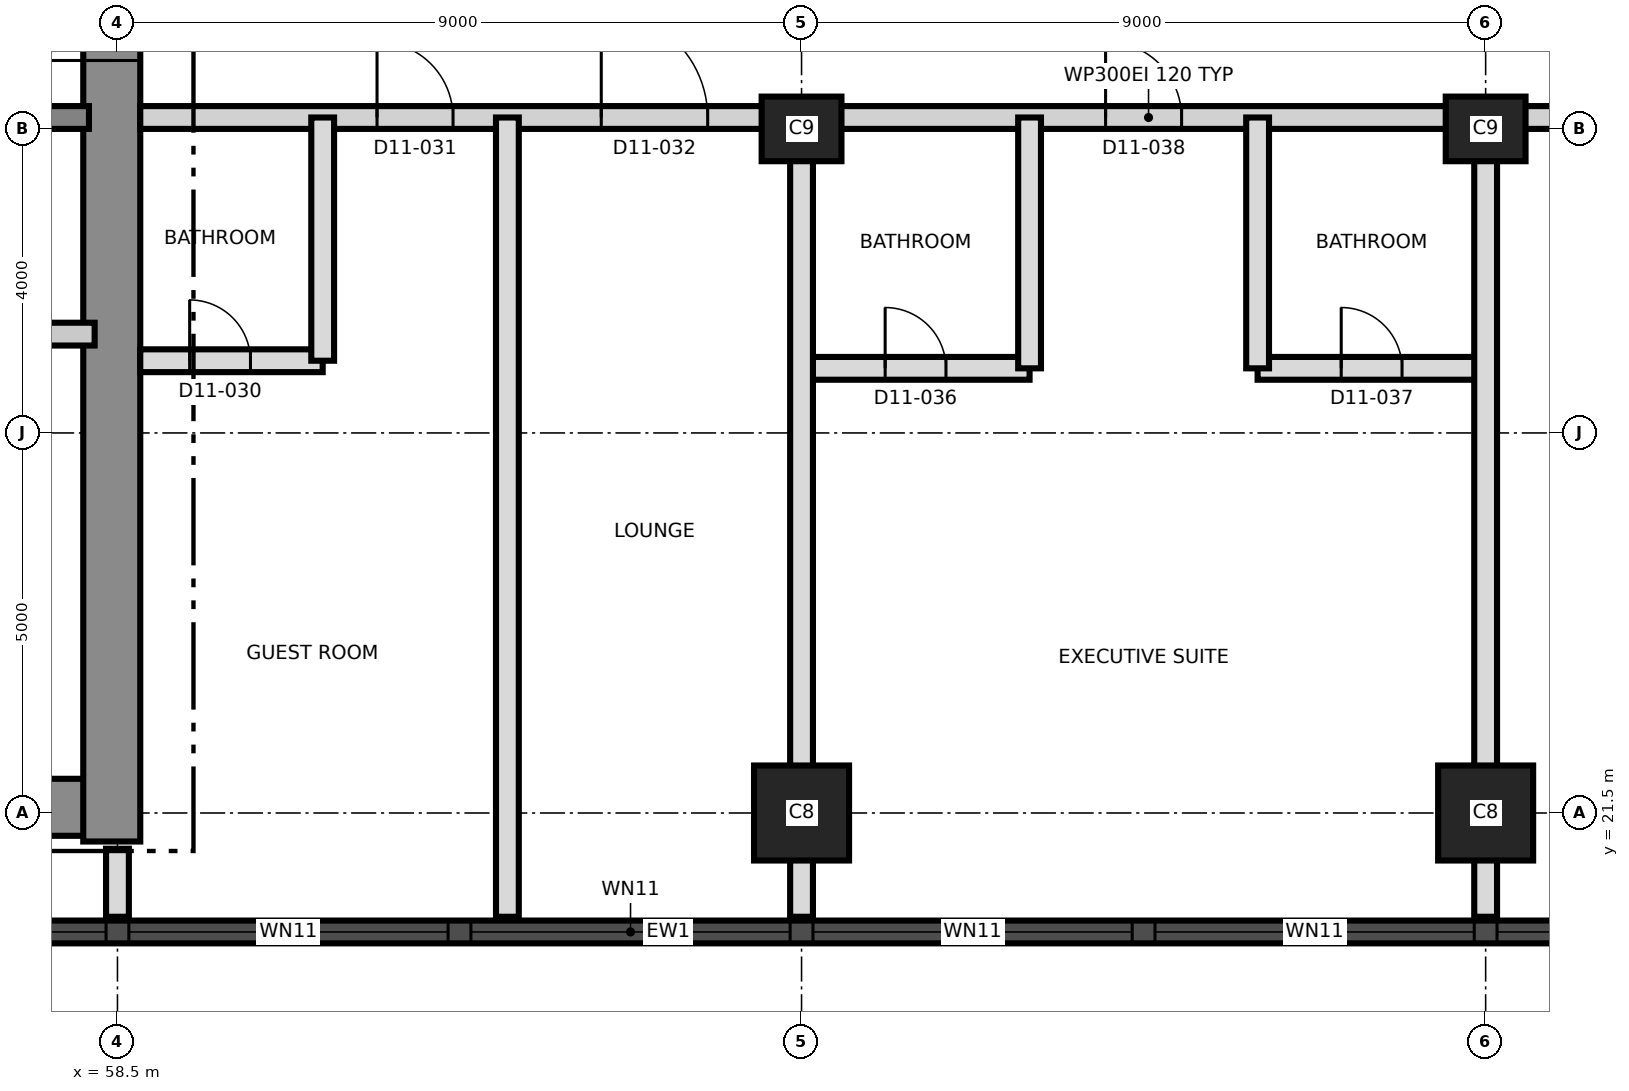
"""IFC4 building model, lengths in metres.
Left out: names, types, materials, properties, quantities, classifications, styles, units other than length and angle.
Written with IfcOpenShell. Run it as: python <this file> out.ifc"""

import sys

from ifc_helpers import new_model, si_unit, direction, frame, frame_2d, origin, origin_2d, place, context, subcontext, project, spatial, rectangle, extrude, element, fill, save


model = new_model("IFC4")
c1 = context("Model", 3, precision=1e-05, world=origin(), true_north=direction((0.0, 1.0)))
c2 = subcontext(c1, "Body", "Model", "MODEL_VIEW")
j1 = project(units=[si_unit("LENGTHUNIT", "METRE"), si_unit("PLANEANGLEUNIT", "RADIAN")], contexts=[c1])
p1 = place(None, origin())
s1 = spatial("IfcSite", under=j1, at=p1, CompositionType="ELEMENT")
p2 = place(p1, origin())
s2 = spatial("IfcBuilding", under=s1, at=p2, CompositionType="ELEMENT")
p3 = place(p2, frame((0.0, 0.0, 131.5)))
s3 = spatial("IfcBuildingStorey", under=s2, at=p3, CompositionType="ELEMENT", Elevation=131.5)
p4 = place(p3, frame((31.125, 21.575, 0.0), z_axis=(0.0, 0.0, 1.0), x_axis=(1.0, 0.0, 0.0)))
e1 = element("IfcWall", 1, at=p4, inside=s3, PredefinedType="SHEAR", context=c2, shape_type="SweptSolid", body=[
    extrude(rectangle(XDim=27.0, YDim=0.75, at=frame_2d((13.5, 0.0))), origin(), (0.0, 0.0, 1.0), 3.7),
])
p5 = place(p3, frame((58.425, 21.125, 0.0), z_axis=(0.0, 0.0, 1.0), x_axis=(0.0, 1.0, 0.0)))
e2 = element("IfcWall", 2, at=p5, inside=s3, PredefinedType="SHEAR", context=c2, shape_type="SweptSolid", body=[
    extrude(rectangle(XDim=18.75, YDim=0.75, at=frame_2d((9.375, 0.0))), origin(), (0.0, 0.0, 1.0), 3.7),
])
p6 = place(p5, frame((10.275, 0.0, 0.0)))
e3 = element("IfcOpeningElement", 3, at=p6, cuts=e2, PredefinedType="OPENING", context=c2, shape_type="SweptSolid", body=[
    extrude(rectangle(XDim=1.2, YDim=2.1, at=frame_2d((0.6, 1.05))), frame((0.0, 0.385, 0.0), z_axis=(0.0, -1.0, 0.0), x_axis=(1.0, 0.0, 0.0)), (0.0, 0.0, 1.0), 0.77),
])
p7 = place(p3, frame((31.875, 30.65, 0.0), z_axis=(0.0, 0.0, 1.0), x_axis=(1.0, 0.0, 0.0)))
e4 = element("IfcWall", 4, at=p7, inside=s3, PredefinedType="SHEAR", context=c2, shape_type="SweptSolid", body=[
    extrude(rectangle(XDim=26.25, YDim=0.3, at=frame_2d((13.125, 0.0))), origin(), (0.0, 0.0, 1.0), 3.7),
])
p8 = place(p7, frame((24.625, 0.0, 0.0)))
e5 = element("IfcOpeningElement", 5, at=p8, cuts=e4, PredefinedType="OPENING", context=c2, shape_type="SweptSolid", body=[
    extrude(rectangle(XDim=1.0, YDim=2.1, at=frame_2d((0.5, 1.05))), frame((0.0, 0.16, 0.0), z_axis=(0.0, -1.0, 0.0), x_axis=(1.0, 0.0, 0.0)), (0.0, 0.0, 1.0), 0.32),
])
p9 = place(p7, frame((11.425, 0.0, 0.0)))
e6 = element("IfcOpeningElement", 6, at=p9, cuts=e4, PredefinedType="OPENING", context=c2, shape_type="SweptSolid", body=[
    extrude(rectangle(XDim=1.0, YDim=2.1, at=frame_2d((0.5, 1.05))), frame((0.0, 0.16, 0.0), z_axis=(0.0, -1.0, 0.0), x_axis=(1.0, 0.0, 0.0)), (0.0, 0.0, 1.0), 0.32),
])
for number, where, z_axis, x_axis in (
    (7, (67.5, 21.5, 0.0), (0.0, 0.0, 1.0), (1.0, 0.0, 0.0)),
    (8, (76.5, 21.5, 0.0), (0.0, 0.0, 1.0), (1.0, 0.0, 0.0)),
):
    element("IfcColumn", number, at=place(p3, frame(where, z_axis=z_axis, x_axis=x_axis)), inside=s3, PredefinedType="COLUMN", context=c2, shape_type="SweptSolid", body=[
        extrude(rectangle(XDim=1.25, YDim=1.25, at=origin_2d()), origin(), (0.0, 0.0, 1.0), 3.7),
    ])
for number, where, z_axis, x_axis in (
    (9, (67.5, 30.5, 0.0), (0.0, 0.0, 1.0), (1.0, 0.0, 0.0)),
    (10, (76.5, 30.5, 0.0), (0.0, 0.0, 1.0), (1.0, 0.0, 0.0)),
):
    element("IfcColumn", number, at=place(p3, frame(where, z_axis=z_axis, x_axis=x_axis)), inside=s3, PredefinedType="COLUMN", context=c2, shape_type="SweptSolid", body=[
        extrude(rectangle(XDim=1.05, YDim=0.85, at=origin_2d()), origin(), (0.0, 0.0, 1.0), 3.7),
    ])
p10 = place(p3, frame((44.01, 19.935, 0.0), z_axis=(0.0, 0.0, 1.0), x_axis=(1.0, 0.0, 0.0)))
e11 = element("IfcWall", 11, at=p10, inside=s3, PredefinedType="SOLIDWALL", context=c2, shape_type="SweptSolid", body=[
    extrude(rectangle(XDim=43.477, YDim=0.3, at=frame_2d((21.738, 0.0))), origin(), (0.0, 0.0, 1.0), 3.4),
])
p11 = place(p10, frame((1.845, 0.0, 0.3)))
e12 = element("IfcOpeningElement", 12, at=p11, cuts=e11, PredefinedType="OPENING", context=c2, shape_type="SweptSolid", body=[
    extrude(rectangle(XDim=1.8, YDim=2.4, at=frame_2d((0.9, 1.2))), frame((0.0, 0.16, 0.0), z_axis=(0.0, -1.0, 0.0), x_axis=(1.0, 0.0, 0.0)), (0.0, 0.0, 1.0), 0.32),
])
p12 = place(p10, frame((5.64, 0.0, 0.9)))
e13 = element("IfcOpeningElement", 13, at=p12, cuts=e11, PredefinedType="OPENING", context=c2, shape_type="SweptSolid", body=[
    extrude(rectangle(XDim=4.2, YDim=1.5, at=frame_2d((2.1, 0.75))), frame((0.0, 0.16, 0.0), z_axis=(0.0, -1.0, 0.0), x_axis=(1.0, 0.0, 0.0)), (0.0, 0.0, 1.0), 0.32),
])
p13 = place(p10, frame((10.14, 0.0, 0.9)))
e14 = element("IfcOpeningElement", 14, at=p13, cuts=e11, PredefinedType="OPENING", context=c2, shape_type="SweptSolid", body=[
    extrude(rectangle(XDim=4.2, YDim=1.5, at=frame_2d((2.1, 0.75))), frame((0.0, 0.16, 0.0), z_axis=(0.0, -1.0, 0.0), x_axis=(1.0, 0.0, 0.0)), (0.0, 0.0, 1.0), 0.32),
])
p14 = place(p10, frame((14.64, 0.0, 0.9)))
e15 = element("IfcOpeningElement", 15, at=p14, cuts=e11, PredefinedType="OPENING", context=c2, shape_type="SweptSolid", body=[
    extrude(rectangle(XDim=4.2, YDim=1.5, at=frame_2d((2.1, 0.75))), frame((0.0, 0.16, 0.0), z_axis=(0.0, -1.0, 0.0), x_axis=(1.0, 0.0, 0.0)), (0.0, 0.0, 1.0), 0.32),
])
p15 = place(p10, frame((19.14, 0.0, 0.9)))
e16 = element("IfcOpeningElement", 16, at=p15, cuts=e11, PredefinedType="OPENING", context=c2, shape_type="SweptSolid", body=[
    extrude(rectangle(XDim=4.2, YDim=1.5, at=frame_2d((2.1, 0.75))), frame((0.0, 0.16, 0.0), z_axis=(0.0, -1.0, 0.0), x_axis=(1.0, 0.0, 0.0)), (0.0, 0.0, 1.0), 0.32),
])
p16 = place(p10, frame((23.64, 0.0, 0.9)))
e17 = element("IfcOpeningElement", 17, at=p16, cuts=e11, PredefinedType="OPENING", context=c2, shape_type="SweptSolid", body=[
    extrude(rectangle(XDim=4.2, YDim=1.5, at=frame_2d((2.1, 0.75))), frame((0.0, 0.16, 0.0), z_axis=(0.0, -1.0, 0.0), x_axis=(1.0, 0.0, 0.0)), (0.0, 0.0, 1.0), 0.32),
])
p17 = place(p10, frame((28.14, 0.0, 0.9)))
e18 = element("IfcOpeningElement", 18, at=p17, cuts=e11, PredefinedType="OPENING", context=c2, shape_type="SweptSolid", body=[
    extrude(rectangle(XDim=4.2, YDim=1.5, at=frame_2d((2.1, 0.75))), frame((0.0, 0.16, 0.0), z_axis=(0.0, -1.0, 0.0), x_axis=(1.0, 0.0, 0.0)), (0.0, 0.0, 1.0), 0.32),
])
p18 = place(p10, frame((32.64, 0.0, 0.9)))
e19 = element("IfcOpeningElement", 19, at=p18, cuts=e11, PredefinedType="OPENING", context=c2, shape_type="SweptSolid", body=[
    extrude(rectangle(XDim=4.2, YDim=1.5, at=frame_2d((2.1, 0.75))), frame((0.0, 0.16, 0.0), z_axis=(0.0, -1.0, 0.0), x_axis=(1.0, 0.0, 0.0)), (0.0, 0.0, 1.0), 0.32),
])
p19 = place(p10, frame((37.14, 0.0, 0.9)))
e20 = element("IfcOpeningElement", 20, at=p19, cuts=e11, PredefinedType="OPENING", context=c2, shape_type="SweptSolid", body=[
    extrude(rectangle(XDim=4.2, YDim=1.5, at=frame_2d((2.1, 0.75))), frame((0.0, 0.16, 0.0), z_axis=(0.0, -1.0, 0.0), x_axis=(1.0, 0.0, 0.0)), (0.0, 0.0, 1.0), 0.32),
])
p20 = place(p3, frame((55.8, 27.8, 0.0), z_axis=(0.0, 0.0, 1.0), x_axis=(1.0, 0.0, 0.0)))
e21 = element("IfcWall", 21, at=p20, inside=s3, PredefinedType="PARTITIONING", context=c2, shape_type="SweptSolid", body=[
    extrude(rectangle(XDim=2.4, YDim=0.3, at=frame_2d((1.2, 0.0))), origin(), (0.0, 0.0, 1.0), 3.4),
])
p21 = place(p20, frame((0.75, 0.0, 0.0)))
e22 = element("IfcOpeningElement", 22, at=p21, cuts=e21, PredefinedType="OPENING", context=c2, shape_type="SweptSolid", body=[
    extrude(rectangle(XDim=0.9, YDim=2.1, at=frame_2d((0.45, 1.05))), frame((0.0, 0.16, 0.0), z_axis=(0.0, -1.0, 0.0), x_axis=(1.0, 0.0, 0.0)), (0.0, 0.0, 1.0), 0.32),
])
p22 = place(p3, frame((67.5, 27.35, 0.0), z_axis=(0.0, 0.0, 1.0), x_axis=(1.0, 0.0, 0.0)))
e23 = element("IfcWall", 23, at=p22, inside=s3, PredefinedType="PARTITIONING", context=c2, shape_type="SweptSolid", body=[
    extrude(rectangle(XDim=3.0, YDim=0.3, at=frame_2d((1.5, 0.0))), origin(), (0.0, 0.0, 1.0), 3.4),
])
p23 = place(p22, frame((1.1, 0.0, 0.0)))
e24 = element("IfcOpeningElement", 24, at=p23, cuts=e23, PredefinedType="OPENING", context=c2, shape_type="SweptSolid", body=[
    extrude(rectangle(XDim=0.8, YDim=2.1, at=frame_2d((0.4, 1.05))), frame((0.0, 0.16, 0.0), z_axis=(0.0, -1.0, 0.0), x_axis=(1.0, 0.0, 0.0)), (0.0, 0.0, 1.0), 0.32),
])
p24 = place(p3, frame((73.5, 27.35, 0.0), z_axis=(0.0, 0.0, 1.0), x_axis=(1.0, 0.0, 0.0)))
e25 = element("IfcWall", 25, at=p24, inside=s3, PredefinedType="PARTITIONING", context=c2, shape_type="SweptSolid", body=[
    extrude(rectangle(XDim=3.0, YDim=0.3, at=frame_2d((1.5, 0.0))), origin(), (0.0, 0.0, 1.0), 3.4),
])
p25 = place(p24, frame((1.1, 0.0, 0.0)))
e26 = element("IfcOpeningElement", 26, at=p25, cuts=e25, PredefinedType="OPENING", context=c2, shape_type="SweptSolid", body=[
    extrude(rectangle(XDim=0.8, YDim=2.1, at=frame_2d((0.4, 1.05))), frame((0.0, 0.16, 0.0), z_axis=(0.0, -1.0, 0.0), x_axis=(1.0, 0.0, 0.0)), (0.0, 0.0, 1.0), 0.32),
])
p26 = place(p3, frame((58.8, 27.45, 0.0), z_axis=(0.0, 0.0, 1.0), x_axis=(1.0, 0.0, 0.0)))
e27 = element("IfcWall", 27, at=p26, inside=s3, PredefinedType="PARTITIONING", context=c2, shape_type="SweptSolid", body=[
    extrude(rectangle(XDim=2.4, YDim=0.3, at=frame_2d((1.2, 0.0))), origin(), (0.0, 0.0, 1.0), 3.4),
])
p27 = place(p26, frame((0.65, 0.0, 0.0)))
e28 = element("IfcOpeningElement", 28, at=p27, cuts=e27, PredefinedType="OPENING", context=c2, shape_type="SweptSolid", body=[
    extrude(rectangle(XDim=0.8, YDim=2.1, at=frame_2d((0.4, 1.05))), frame((0.0, 0.16, 0.0), z_axis=(0.0, -1.0, 0.0), x_axis=(1.0, 0.0, 0.0)), (0.0, 0.0, 1.0), 0.32),
])
p28 = place(p3, frame((58.8, 30.65, 0.0), z_axis=(0.0, 0.0, 1.0), x_axis=(1.0, 0.0, 0.0)))
e29 = element("IfcWall", 29, at=p28, inside=s3, PredefinedType="PARTITIONING", context=c2, shape_type="SweptSolid", body=[
    extrude(rectangle(XDim=26.53, YDim=0.3, at=frame_2d((13.265, 0.0))), origin(), (0.0, 0.0, 1.0), 3.4),
])
p29 = place(p28, frame((3.115, 0.0, 0.0)))
e30 = element("IfcOpeningElement", 30, at=p29, cuts=e29, PredefinedType="OPENING", context=c2, shape_type="SweptSolid", body=[
    extrude(rectangle(XDim=1.0, YDim=2.1, at=frame_2d((0.5, 1.05))), frame((0.0, 0.16, 0.0), z_axis=(0.0, -1.0, 0.0), x_axis=(1.0, 0.0, 0.0)), (0.0, 0.0, 1.0), 0.32),
])
p30 = place(p28, frame((6.065, 0.0, 0.0)))
e31 = element("IfcOpeningElement", 31, at=p30, cuts=e29, PredefinedType="OPENING", context=c2, shape_type="SweptSolid", body=[
    extrude(rectangle(XDim=1.4, YDim=2.1, at=frame_2d((0.7, 1.05))), frame((0.0, 0.16, 0.0), z_axis=(0.0, -1.0, 0.0), x_axis=(1.0, 0.0, 0.0)), (0.0, 0.0, 1.0), 0.32),
])
p31 = place(p28, frame((12.7, 0.0, 0.0)))
e32 = element("IfcOpeningElement", 32, at=p31, cuts=e29, PredefinedType="OPENING", context=c2, shape_type="SweptSolid", body=[
    extrude(rectangle(XDim=1.0, YDim=2.4, at=frame_2d((0.5, 1.2))), frame((0.0, 0.16, 0.0), z_axis=(0.0, -1.0, 0.0), x_axis=(1.0, 0.0, 0.0)), (0.0, 0.0, 1.0), 0.32),
])
p32 = place(p28, frame((18.85, 0.0, 0.0)))
e33 = element("IfcOpeningElement", 33, at=p32, cuts=e29, PredefinedType="OPENING", context=c2, shape_type="SweptSolid", body=[
    extrude(rectangle(XDim=1.0, YDim=2.1, at=frame_2d((0.5, 1.05))), frame((0.0, 0.16, 0.0), z_axis=(0.0, -1.0, 0.0), x_axis=(1.0, 0.0, 0.0)), (0.0, 0.0, 1.0), 0.32),
])
p33 = place(p28, frame((24.7, 0.0, 0.0)))
e34 = element("IfcOpeningElement", 34, at=p33, cuts=e29, PredefinedType="OPENING", context=c2, shape_type="SweptSolid", body=[
    extrude(rectangle(XDim=1.0, YDim=2.1, at=frame_2d((0.5, 1.05))), frame((0.0, 0.16, 0.0), z_axis=(0.0, -1.0, 0.0), x_axis=(1.0, 0.0, 0.0)), (0.0, 0.0, 1.0), 0.32),
])
p34 = place(p3, frame((58.5, 20.135, 0.0), z_axis=(0.0, 0.0, 1.0), x_axis=(0.0, 1.0, 0.0)))
e35 = element("IfcWall", 35, at=p34, inside=s3, PredefinedType="PARTITIONING", context=c2, shape_type="SweptSolid", body=[
    extrude(rectangle(XDim=0.895, YDim=0.3, at=frame_2d((0.448, 0.0))), origin(), (0.0, 0.0, 1.0), 3.35),
])
p35 = place(p3, frame((61.2, 27.45, 0.0), z_axis=(0.0, 0.0, 1.0), x_axis=(0.0, 1.0, 0.0)))
e36 = element("IfcWall", 36, at=p35, inside=s3, PredefinedType="PARTITIONING", context=c2, shape_type="SweptSolid", body=[
    extrude(rectangle(XDim=3.2, YDim=0.3, at=frame_2d((1.6, 0.0))), origin(), (0.0, 0.0, 1.0), 3.4),
])
for number, where, z_axis, x_axis in (
    (37, (63.63, 20.135, 0.0), (0.0, 0.0, 1.0), (0.0, 1.0, 0.0)),
    (38, (67.5, 20.135, 0.0), (0.0, 0.0, 1.0), (0.0, 1.0, 0.0)),
):
    element("IfcWall", number, at=place(p3, frame(where, z_axis=z_axis, x_axis=x_axis)), inside=s3, PredefinedType="PARTITIONING", context=c2, shape_type="SweptSolid", body=[
        extrude(rectangle(XDim=10.515, YDim=0.3, at=frame_2d((5.257, 0.0))), origin(), (0.0, 0.0, 1.0), 3.35),
    ])
for number, where, z_axis, x_axis in (
    (39, (70.5, 27.35, 0.0), (0.0, 0.0, 1.0), (0.0, 1.0, 0.0)),
    (40, (73.5, 27.35, 0.0), (0.0, 0.0, 1.0), (0.0, 1.0, 0.0)),
):
    element("IfcWall", number, at=place(p3, frame(where, z_axis=z_axis, x_axis=x_axis)), inside=s3, PredefinedType="PARTITIONING", context=c2, shape_type="SweptSolid", body=[
        extrude(rectangle(XDim=3.3, YDim=0.3, at=frame_2d((1.65, 0.0))), origin(), (0.0, 0.0, 1.0), 3.4),
    ])
p36 = place(p3, frame((76.5, 20.135, 0.0), z_axis=(0.0, 0.0, 1.0), x_axis=(0.0, 1.0, 0.0)))
e41 = element("IfcWall", 41, at=p36, inside=s3, PredefinedType="PARTITIONING", context=c2, shape_type="SweptSolid", body=[
    extrude(rectangle(XDim=10.515, YDim=0.3, at=frame_2d((5.257, 0.0))), origin(), (0.0, 0.0, 1.0), 3.35),
])
p37 = place(p13, origin())
e42 = element("IfcWindow", 42, at=p37, inside=s3, PartitioningType="SINGLE_PANEL", PredefinedType="WINDOW", context=c2, shape_type="SweptSolid", body=[
    extrude(rectangle(XDim=4.2, YDim=1.5, at=frame_2d((2.1, 0.75))), frame((0.0, 0.03, 0.0), z_axis=(0.0, -1.0, 0.0), x_axis=(1.0, 0.0, 0.0)), (0.0, 0.0, 1.0), 0.06),
])
fill(e14, e42)
p38 = place(p14, origin())
e43 = element("IfcWindow", 43, at=p38, inside=s3, PartitioningType="SINGLE_PANEL", PredefinedType="WINDOW", context=c2, shape_type="SweptSolid", body=[
    extrude(rectangle(XDim=4.2, YDim=1.5, at=frame_2d((2.1, 0.75))), frame((0.0, 0.03, 0.0), z_axis=(0.0, -1.0, 0.0), x_axis=(1.0, 0.0, 0.0)), (0.0, 0.0, 1.0), 0.06),
])
fill(e15, e43)
p39 = place(p15, origin())
e44 = element("IfcWindow", 44, at=p39, inside=s3, PartitioningType="SINGLE_PANEL", PredefinedType="WINDOW", context=c2, shape_type="SweptSolid", body=[
    extrude(rectangle(XDim=4.2, YDim=1.5, at=frame_2d((2.1, 0.75))), frame((0.0, 0.03, 0.0), z_axis=(0.0, -1.0, 0.0), x_axis=(1.0, 0.0, 0.0)), (0.0, 0.0, 1.0), 0.06),
])
fill(e16, e44)
p40 = place(p16, origin())
e45 = element("IfcWindow", 45, at=p40, inside=s3, PartitioningType="SINGLE_PANEL", PredefinedType="WINDOW", context=c2, shape_type="SweptSolid", body=[
    extrude(rectangle(XDim=4.2, YDim=1.5, at=frame_2d((2.1, 0.75))), frame((0.0, 0.03, 0.0), z_axis=(0.0, -1.0, 0.0), x_axis=(1.0, 0.0, 0.0)), (0.0, 0.0, 1.0), 0.06),
])
fill(e17, e45)
p41 = place(p17, origin())
e46 = element("IfcWindow", 46, at=p41, inside=s3, PartitioningType="SINGLE_PANEL", PredefinedType="WINDOW", context=c2, shape_type="SweptSolid", body=[
    extrude(rectangle(XDim=4.2, YDim=1.5, at=frame_2d((2.1, 0.75))), frame((0.0, 0.03, 0.0), z_axis=(0.0, -1.0, 0.0), x_axis=(1.0, 0.0, 0.0)), (0.0, 0.0, 1.0), 0.06),
])
fill(e18, e46)
p42 = place(p18, origin())
e47 = element("IfcWindow", 47, at=p42, inside=s3, PartitioningType="SINGLE_PANEL", PredefinedType="WINDOW", context=c2, shape_type="SweptSolid", body=[
    extrude(rectangle(XDim=4.2, YDim=1.5, at=frame_2d((2.1, 0.75))), frame((0.0, 0.03, 0.0), z_axis=(0.0, -1.0, 0.0), x_axis=(1.0, 0.0, 0.0)), (0.0, 0.0, 1.0), 0.06),
])
fill(e19, e47)
p43 = place(p6, origin())
e48 = element("IfcDoor", 48, at=p43, inside=s3, OperationType="SINGLE_SWING_LEFT", PredefinedType="DOOR", context=c2, shape_type="SweptSolid", body=[
    extrude(rectangle(XDim=1.2, YDim=2.1, at=frame_2d((0.6, 1.05))), frame((0.0, 0.025, 0.0), z_axis=(0.0, -1.0, 0.0), x_axis=(1.0, 0.0, 0.0)), (0.0, 0.0, 1.0), 0.05),
])
fill(e3, e48)
p44 = place(p27, origin())
e49 = element("IfcDoor", 49, at=p44, inside=s3, OperationType="SINGLE_SWING_LEFT", PredefinedType="DOOR", context=c2, shape_type="SweptSolid", body=[
    extrude(rectangle(XDim=0.8, YDim=2.1, at=frame_2d((0.4, 1.05))), frame((0.0, 0.025, 0.0), z_axis=(0.0, -1.0, 0.0), x_axis=(1.0, 0.0, 0.0)), (0.0, 0.0, 1.0), 0.05),
])
fill(e28, e49)
p45 = place(p29, origin())
e50 = element("IfcDoor", 50, at=p45, inside=s3, OperationType="SINGLE_SWING_LEFT", PredefinedType="DOOR", context=c2, shape_type="SweptSolid", body=[
    extrude(rectangle(XDim=1.0, YDim=2.1, at=frame_2d((0.5, 1.05))), frame((0.0, 0.025, 0.0), z_axis=(0.0, -1.0, 0.0), x_axis=(1.0, 0.0, 0.0)), (0.0, 0.0, 1.0), 0.05),
])
fill(e30, e50)
p46 = place(p30, origin())
e51 = element("IfcDoor", 51, at=p46, inside=s3, OperationType="SINGLE_SWING_RIGHT", PredefinedType="DOOR", context=c2, shape_type="SweptSolid", body=[
    extrude(rectangle(XDim=1.4, YDim=2.1, at=frame_2d((0.7, 1.05))), frame((0.0, 0.025, 0.0), z_axis=(0.0, -1.0, 0.0), x_axis=(1.0, 0.0, 0.0)), (0.0, 0.0, 1.0), 0.05),
])
fill(e31, e51)
p47 = place(p23, origin())
e52 = element("IfcDoor", 52, at=p47, inside=s3, OperationType="SINGLE_SWING_LEFT", PredefinedType="DOOR", context=c2, shape_type="SweptSolid", body=[
    extrude(rectangle(XDim=0.8, YDim=2.1, at=frame_2d((0.4, 1.05))), frame((0.0, 0.025, 0.0), z_axis=(0.0, -1.0, 0.0), x_axis=(1.0, 0.0, 0.0)), (0.0, 0.0, 1.0), 0.05),
])
fill(e24, e52)
p48 = place(p25, origin())
e53 = element("IfcDoor", 53, at=p48, inside=s3, OperationType="SINGLE_SWING_RIGHT", PredefinedType="DOOR", context=c2, shape_type="SweptSolid", body=[
    extrude(rectangle(XDim=0.8, YDim=2.1, at=frame_2d((0.4, 1.05))), frame((0.0, 0.025, 0.0), z_axis=(0.0, -1.0, 0.0), x_axis=(1.0, 0.0, 0.0)), (0.0, 0.0, 1.0), 0.05),
])
fill(e26, e53)
p49 = place(p31, origin())
e54 = element("IfcDoor", 54, at=p49, inside=s3, OperationType="SINGLE_SWING_LEFT", PredefinedType="DOOR", context=c2, shape_type="SweptSolid", body=[
    extrude(rectangle(XDim=1.0, YDim=2.4, at=frame_2d((0.5, 1.2))), frame((0.0, 0.025, 0.0), z_axis=(0.0, -1.0, 0.0), x_axis=(1.0, 0.0, 0.0)), (0.0, 0.0, 1.0), 0.05),
])
fill(e32, e54)
save(model, sys.argv[1])
